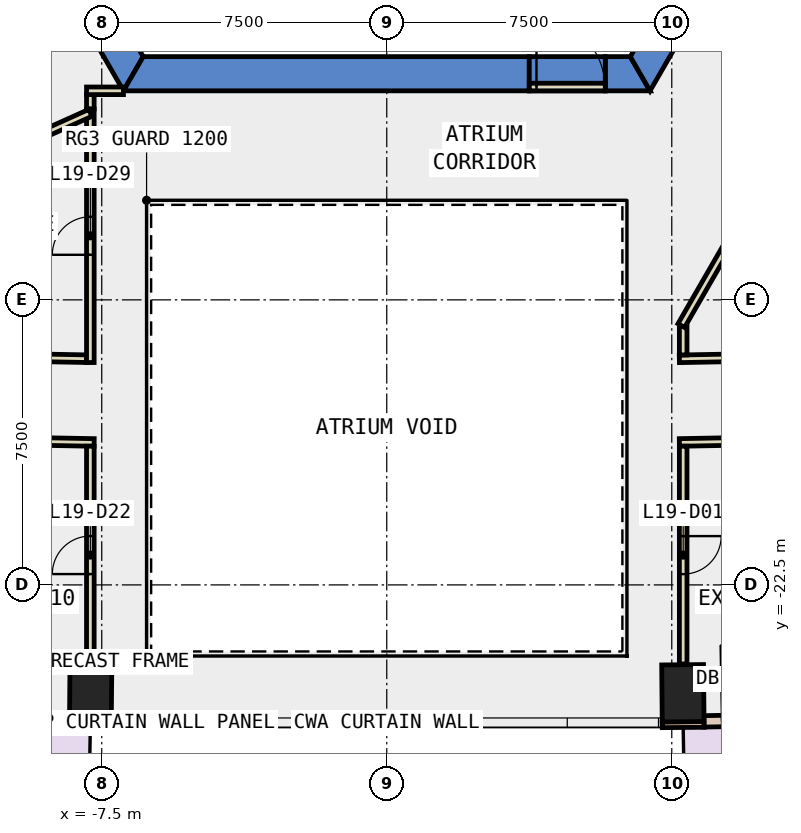
"""IFC4 building model, lengths in metres.
Left out: names, types, materials, properties, quantities, classifications, styles, units other than length and angle.
Written with IfcOpenShell. Run it as: python <this file> out.ifc"""

import sys

from ifc_helpers import new_model, si_unit, direction, frame, frame_2d, origin, origin_2d, place, context, subcontext, project, spatial, polyline, rectangle, outline, extrude, element, fill, save


model = new_model("IFC4")
c1 = context("Model", 3, precision=1e-05, world=origin(), true_north=direction((0.0, 1.0)))
c2 = subcontext(c1, "Body", "Model", "MODEL_VIEW")
j1 = project(units=[si_unit("LENGTHUNIT", "METRE"), si_unit("PLANEANGLEUNIT", "RADIAN")], contexts=[c1])
p1 = place(None, origin())
s1 = spatial("IfcSite", under=j1, at=p1, CompositionType="ELEMENT")
p2 = place(p1, origin())
s2 = spatial("IfcBuilding", under=s1, at=p2, CompositionType="ELEMENT")
p3 = place(p2, frame((0.0, 0.0, 90.8)))
s3 = spatial("IfcBuildingStorey", under=s2, at=p3, CompositionType="ELEMENT", Elevation=90.8)
for number, where, z_axis, x_axis in (
    (1, (-7.792, -25.351, -0.4), (0.0, 0.0, 1.0), (-1.0, 0.009, 0.0)),
    (2, (7.792, -25.351, -0.4), (0.0, 0.0, 1.0), (1.0, 0.009, 0.0)),
):
    element("IfcColumn", number, at=place(p3, frame(where, z_axis=z_axis, x_axis=x_axis)), inside=s3, PredefinedType="COLUMN", context=c2, shape_type="SweptSolid", body=[
        extrude(rectangle(XDim=1.1, YDim=1.5, at=origin_2d()), origin(), (0.0, 0.0, 1.0), 4.2),
    ])
p4 = place(p3, frame((0.0, 0.0, -0.4)))
e3 = element("IfcWall", 3, at=p4, inside=s3, PredefinedType="SHEAR", context=c2, shape_type="SweptSolid", body=[
    extrude(outline(polyline([(-13.856, 2.5), (-6.928, -9.5), (-6.409, -8.6), (-12.817, 2.5), (-13.856, 2.5)])), origin(), (0.0, 0.0, 1.0), 4.2),
])
p5 = place(p3, frame((0.0, 0.0, -0.4)))
e4 = element("IfcWall", 4, at=p5, inside=s3, PredefinedType="SHEAR", context=c2, shape_type="SweptSolid", body=[
    extrude(outline(polyline([(3.75, -9.5), (3.75, -8.6), (-6.409, -8.6), (-6.928, -9.5), (3.75, -9.5)])), origin(), (0.0, 0.0, 1.0), 4.2),
])
p6 = place(p3, frame((0.0, 0.0, -0.4)))
e5 = element("IfcWall", 5, at=p6, inside=s3, PredefinedType="SHEAR", context=c2, shape_type="SweptSolid", body=[
    extrude(outline(polyline([(5.75, -8.6), (5.75, -9.5), (6.928, -9.5), (6.409, -8.6), (5.75, -8.6)])), origin(), (0.0, 0.0, 1.0), 4.2),
])
p7 = place(p3, frame((0.0, 0.0, 3.6)))
e6 = element("IfcWall", 6, at=p7, inside=s3, PredefinedType="SHEAR", context=c2, shape_type="SweptSolid", body=[
    extrude(outline(polyline([(5.75, -9.5), (5.75, -8.6), (3.75, -8.6), (3.75, -9.5), (5.75, -9.5)])), origin(), (0.0, 0.0, 1.0), 0.2),
])
p8 = place(p3, frame((0.0, 0.0, -0.4)))
e7 = element("IfcWall", 7, at=p8, inside=s3, PredefinedType="SHEAR", context=c2, shape_type="SweptSolid", body=[
    extrude(outline(polyline([(8.117, -7.44), (7.338, -6.99), (6.409, -8.6), (6.928, -9.5), (8.117, -7.44)])), origin(), (0.0, 0.0, 1.0), 4.2),
])
for number, where, z_axis, x_axis in (
    (8, (-8.349, -26.171, 0.0), (0.0, 0.0, 1.0), (1.0, -0.009, 0.0)),
    (9, (7.249, -26.181, 0.0), (0.0, 0.0, 1.0), (1.0, 0.009, 0.0)),
):
    element("IfcWall", number, at=place(p3, frame(where, z_axis=z_axis, x_axis=x_axis)), inside=s3, PredefinedType="STANDARD", context=c2, shape_type="SweptSolid", body=[
        extrude(rectangle(XDim=1.1, YDim=0.15, at=frame_2d((0.55, 0.0))), origin(), (0.0, 0.0, 1.0), 3.8),
    ])
p9 = place(p3, frame((-14.242, -25.982, 0.0), z_axis=(0.0, 0.0, 1.0), x_axis=(0.999828633111, -0.018512277318, 0.0)))
e10 = element("IfcWall", 10, at=p9, inside=s3, PredefinedType="STANDARD", context=c2, shape_type="SweptSolid", body=[
    extrude(rectangle(XDim=5.895, YDim=0.3, at=frame_2d((2.948, 0.0))), origin(), (0.0, 0.0, 1.0), 3.8),
])
p10 = place(p9, frame((0.474, 0.0, 0.0)))
e11 = element("IfcOpeningElement", 11, at=p10, cuts=e10, PredefinedType="OPENING", context=c2, shape_type="SweptSolid", body=[
    extrude(rectangle(XDim=2.0, YDim=2.4, at=frame_2d((1.0, 1.2))), frame((0.0, 0.16, 0.0), z_axis=(0.0, -1.0, 0.0), x_axis=(1.0, 0.0, 0.0)), (0.0, 0.0, 1.0), 0.32),
])
p11 = place(p9, frame((3.421, 0.0, 0.9)))
e12 = element("IfcOpeningElement", 12, at=p11, cuts=e10, PredefinedType="OPENING", context=c2, shape_type="SweptSolid", body=[
    extrude(rectangle(XDim=2.0, YDim=2.6, at=frame_2d((1.0, 1.3))), frame((0.0, 0.16, 0.0), z_axis=(0.0, -1.0, 0.0), x_axis=(1.0, 0.0, 0.0)), (0.0, 0.0, 1.0), 0.32),
])
p12 = place(p3, frame((8.348, -26.091, 0.0), z_axis=(0.0, 0.0, 1.0), x_axis=(0.999828633111, 0.018512277318, 0.0)))
e13 = element("IfcWall", 13, at=p12, inside=s3, PredefinedType="STANDARD", context=c2, shape_type="SweptSolid", body=[
    extrude(rectangle(XDim=5.895, YDim=0.3, at=frame_2d((2.948, 0.0))), origin(), (0.0, 0.0, 1.0), 3.8),
])
p13 = place(p12, frame((0.474, 0.0, 0.0)))
e14 = element("IfcOpeningElement", 14, at=p13, cuts=e13, PredefinedType="OPENING", context=c2, shape_type="SweptSolid", body=[
    extrude(rectangle(XDim=2.0, YDim=2.4, at=frame_2d((1.0, 1.2))), frame((0.0, 0.16, 0.0), z_axis=(0.0, -1.0, 0.0), x_axis=(1.0, 0.0, 0.0)), (0.0, 0.0, 1.0), 0.32),
])
p14 = place(p12, frame((3.421, 0.0, 0.9)))
e15 = element("IfcOpeningElement", 15, at=p14, cuts=e13, PredefinedType="OPENING", context=c2, shape_type="SweptSolid", body=[
    extrude(rectangle(XDim=2.0, YDim=2.6, at=frame_2d((1.0, 1.3))), frame((0.0, 0.16, 0.0), z_axis=(0.0, -1.0, 0.0), x_axis=(1.0, 0.0, 0.0)), (0.0, 0.0, 1.0), 0.32),
])
p15 = place(p3, frame((7.7, -16.551, 0.0), z_axis=(0.0, 0.0, 1.0), x_axis=(0.999831478914, 0.018357934851, 0.0)))
e16 = element("IfcWall", 16, at=p15, inside=s3, PredefinedType="PARTITIONING", context=c2, shape_type="SweptSolid", body=[
    extrude(rectangle(XDim=6.862, YDim=0.2, at=frame_2d((3.431, 0.0))), origin(), (0.0, 0.0, 1.0), 3.8),
])
p16 = place(p3, frame((-10.408, -16.501, 0.0), z_axis=(0.0, 0.0, 1.0), x_axis=(0.999823568917, -0.018783797216, 0.0)))
e17 = element("IfcWall", 17, at=p16, inside=s3, PredefinedType="PARTITIONING", context=c2, shape_type="SweptSolid", body=[
    extrude(rectangle(XDim=2.509, YDim=0.2, at=frame_2d((1.254, 0.0))), origin(), (0.0, 0.0, 1.0), 3.8),
])
p17 = place(p3, frame((14.689, -18.623, 0.0), z_axis=(0.0, 0.0, 1.0), x_axis=(-0.99982995049, -0.01844098976, 0.0)))
e18 = element("IfcWall", 18, at=p17, inside=s3, PredefinedType="PARTITIONING", context=c2, shape_type="SweptSolid", body=[
    extrude(rectangle(XDim=6.99, YDim=0.2, at=frame_2d((3.495, 0.0))), origin(), (0.0, 0.0, 1.0), 3.8),
])
p18 = place(p3, frame((-7.7, -18.752, 0.0), z_axis=(0.0, 0.0, 1.0), x_axis=(-0.999830394604, 0.018416895142, 0.0)))
e19 = element("IfcWall", 19, at=p18, inside=s3, PredefinedType="PARTITIONING", context=c2, shape_type="SweptSolid", body=[
    extrude(rectangle(XDim=6.84, YDim=0.2, at=frame_2d((3.42, 0.0))), origin(), (0.0, 0.0, 1.0), 3.8),
])
p19 = place(p3, frame((7.8, -15.69, 0.0), z_axis=(0.0, 0.0, 1.0), x_axis=(0.0, -1.0, 0.0)))
e20 = element("IfcWall", 20, at=p19, inside=s3, PredefinedType="PARTITIONING", context=c2, shape_type="SweptSolid", body=[
    extrude(rectangle(XDim=0.759, YDim=0.2, at=frame_2d((0.379, 0.0))), origin(), (0.0, 0.0, 1.0), 3.8),
])
p20 = place(p3, frame((-7.8, -9.98, 0.0), z_axis=(0.0, 0.0, 1.0), x_axis=(0.0, 1.0, 0.0)))
e21 = element("IfcWall", 21, at=p20, inside=s3, PredefinedType="PARTITIONING", context=c2, shape_type="SweptSolid", body=[
    extrude(rectangle(XDim=0.381, YDim=0.2, at=frame_2d((0.19, 0.0))), origin(), (0.0, 0.0, 1.0), 3.8),
])
p21 = place(p3, frame((-7.9, -9.499, 0.0), z_axis=(0.0, 0.0, 1.0), x_axis=(1.0, 0.0, 0.0)))
e22 = element("IfcWall", 22, at=p21, inside=s3, PredefinedType="PARTITIONING", context=c2, shape_type="SweptSolid", body=[
    extrude(rectangle(XDim=0.971, YDim=0.2, at=frame_2d((0.485, 0.0))), origin(), (0.0, 0.0, 1.0), 3.8),
])
p22 = place(p3, frame((-7.8, -16.649, 0.0), z_axis=(0.0, 0.0, 1.0), x_axis=(0.0, 1.0, 0.0)))
e23 = element("IfcWall", 23, at=p22, inside=s3, PredefinedType="PARTITIONING", context=c2, shape_type="SweptSolid", body=[
    extrude(rectangle(XDim=6.669, YDim=0.2, at=frame_2d((3.334, 0.0))), origin(), (0.0, 0.0, 1.0), 3.8),
])
p23 = place(p22, frame((2.835, 0.0, 0.0)))
e24 = element("IfcOpeningElement", 24, at=p23, cuts=e23, PredefinedType="OPENING", context=c2, shape_type="SweptSolid", body=[
    extrude(rectangle(XDim=1.0, YDim=2.1, at=frame_2d((0.5, 1.05))), frame((0.0, 0.11, 0.0), z_axis=(0.0, -1.0, 0.0), x_axis=(1.0, 0.0, 0.0)), (0.0, 0.0, 1.0), 0.22),
])
p24 = place(p3, frame((7.8, -18.85, 0.0), z_axis=(0.0, 0.0, 1.0), x_axis=(0.0, -1.0, 0.0)))
e25 = element("IfcWall", 25, at=p24, inside=s3, PredefinedType="PARTITIONING", context=c2, shape_type="SweptSolid", body=[
    extrude(rectangle(XDim=5.731, YDim=0.2, at=frame_2d((2.865, 0.0))), origin(), (0.0, 0.0, 1.0), 3.8),
])
p25 = place(p24, frame((2.366, 0.0, 0.0)))
e26 = element("IfcOpeningElement", 26, at=p25, cuts=e25, PredefinedType="OPENING", context=c2, shape_type="SweptSolid", body=[
    extrude(rectangle(XDim=1.0, YDim=2.1, at=frame_2d((0.5, 1.05))), frame((0.0, 0.11, 0.0), z_axis=(0.0, -1.0, 0.0), x_axis=(1.0, 0.0, 0.0)), (0.0, 0.0, 1.0), 0.22),
])
p26 = place(p3, frame((-7.8, -24.581, 0.0), z_axis=(0.0, 0.0, 1.0), x_axis=(0.0, 1.0, 0.0)))
e27 = element("IfcWall", 27, at=p26, inside=s3, PredefinedType="PARTITIONING", context=c2, shape_type="SweptSolid", body=[
    extrude(rectangle(XDim=5.731, YDim=0.2, at=frame_2d((2.865, 0.0))), origin(), (0.0, 0.0, 1.0), 3.8),
])
p27 = place(p26, frame((2.366, 0.0, 0.0)))
e28 = element("IfcOpeningElement", 28, at=p27, cuts=e27, PredefinedType="OPENING", context=c2, shape_type="SweptSolid", body=[
    extrude(rectangle(XDim=1.0, YDim=2.1, at=frame_2d((0.5, 1.05))), frame((0.0, 0.11, 0.0), z_axis=(0.0, -1.0, 0.0), x_axis=(1.0, 0.0, 0.0)), (0.0, 0.0, 1.0), 0.22),
])
p28 = place(p3, frame((-7.8, -10.08, 0.0), z_axis=(0.0, 0.0, 1.0), x_axis=(-0.911938383636, -0.410327167577, 0.0)))
e29 = element("IfcWall", 29, at=p28, inside=s3, PredefinedType="PARTITIONING", context=c2, shape_type="SweptSolid", body=[
    extrude(rectangle(XDim=5.683, YDim=0.2, at=frame_2d((2.842, 0.0))), origin(), (0.0, 0.0, 1.0), 3.8),
])
p29 = place(p3, frame((3.75, -9.4, 0.0), z_axis=(0.0, 0.0, 1.0), x_axis=(1.0, 0.0, 0.0)))
e30 = element("IfcWall", 30, at=p29, inside=s3, PredefinedType="PARTITIONING", context=c2, shape_type="SweptSolid", body=[
    extrude(rectangle(XDim=2.0, YDim=0.2, at=frame_2d((1.0, 0.0))), origin(), (0.0, 0.0, 1.0), 2.4),
])
p30 = place(p29, frame((0.19, 0.0, 0.0)))
e31 = element("IfcOpeningElement", 31, at=p30, cuts=e30, PredefinedType="OPENING", context=c2, shape_type="SweptSolid", body=[
    extrude(rectangle(XDim=1.8, YDim=2.1, at=frame_2d((0.9, 1.05))), frame((0.0, 0.11, 0.0), z_axis=(0.0, -1.0, 0.0), x_axis=(1.0, 0.0, 0.0)), (0.0, 0.0, 1.0), 0.22),
])
p31 = place(p3, frame((12.401, -7.621, 0.0), z_axis=(0.0, 0.0, 1.0), x_axis=(-0.499983724212, -0.866034800411, 0.0)))
e32 = element("IfcWall", 32, at=p31, inside=s3, PredefinedType="PARTITIONING", context=c2, shape_type="SweptSolid", body=[
    extrude(rectangle(XDim=9.302, YDim=0.2, at=frame_2d((4.651, 0.0))), origin(), (0.0, 0.0, 1.0), 3.8),
])
p32 = place(p25, origin())
e33 = element("IfcDoor", 33, at=p32, inside=s3, OperationType="SINGLE_SWING_LEFT", PredefinedType="DOOR", context=c2, shape_type="SweptSolid", body=[
    extrude(rectangle(XDim=1.0, YDim=2.1, at=frame_2d((0.5, 1.05))), frame((0.0, 0.025, 0.0), z_axis=(0.0, -1.0, 0.0), x_axis=(1.0, 0.0, 0.0)), (0.0, 0.0, 1.0), 0.05),
])
fill(e26, e33)
p33 = place(p27, origin())
e34 = element("IfcDoor", 34, at=p33, inside=s3, OperationType="SINGLE_SWING_LEFT", PredefinedType="DOOR", context=c2, shape_type="SweptSolid", body=[
    extrude(rectangle(XDim=1.0, YDim=2.1, at=frame_2d((0.5, 1.05))), frame((0.0, 0.025, 0.0), z_axis=(0.0, -1.0, 0.0), x_axis=(1.0, 0.0, 0.0)), (0.0, 0.0, 1.0), 0.05),
])
fill(e28, e34)
p34 = place(p23, origin())
e35 = element("IfcDoor", 35, at=p34, inside=s3, OperationType="SINGLE_SWING_LEFT", PredefinedType="DOOR", context=c2, shape_type="SweptSolid", body=[
    extrude(rectangle(XDim=1.0, YDim=2.1, at=frame_2d((0.5, 1.05))), frame((0.0, 0.025, 0.0), z_axis=(0.0, -1.0, 0.0), x_axis=(1.0, 0.0, 0.0)), (0.0, 0.0, 1.0), 0.05),
])
fill(e24, e35)
p35 = place(p30, origin())
e36 = element("IfcDoor", 36, at=p35, inside=s3, OperationType="DOUBLE_DOOR_SINGLE_SWING", PredefinedType="DOOR", context=c2, shape_type="SweptSolid", body=[
    extrude(rectangle(XDim=1.8, YDim=2.1, at=frame_2d((0.9, 1.05))), frame((0.0, 0.025, 0.0), z_axis=(0.0, -1.0, 0.0), x_axis=(1.0, 0.0, 0.0)), (0.0, 0.0, 1.0), 0.05),
])
fill(e31, e36)
save(model, sys.argv[1])
